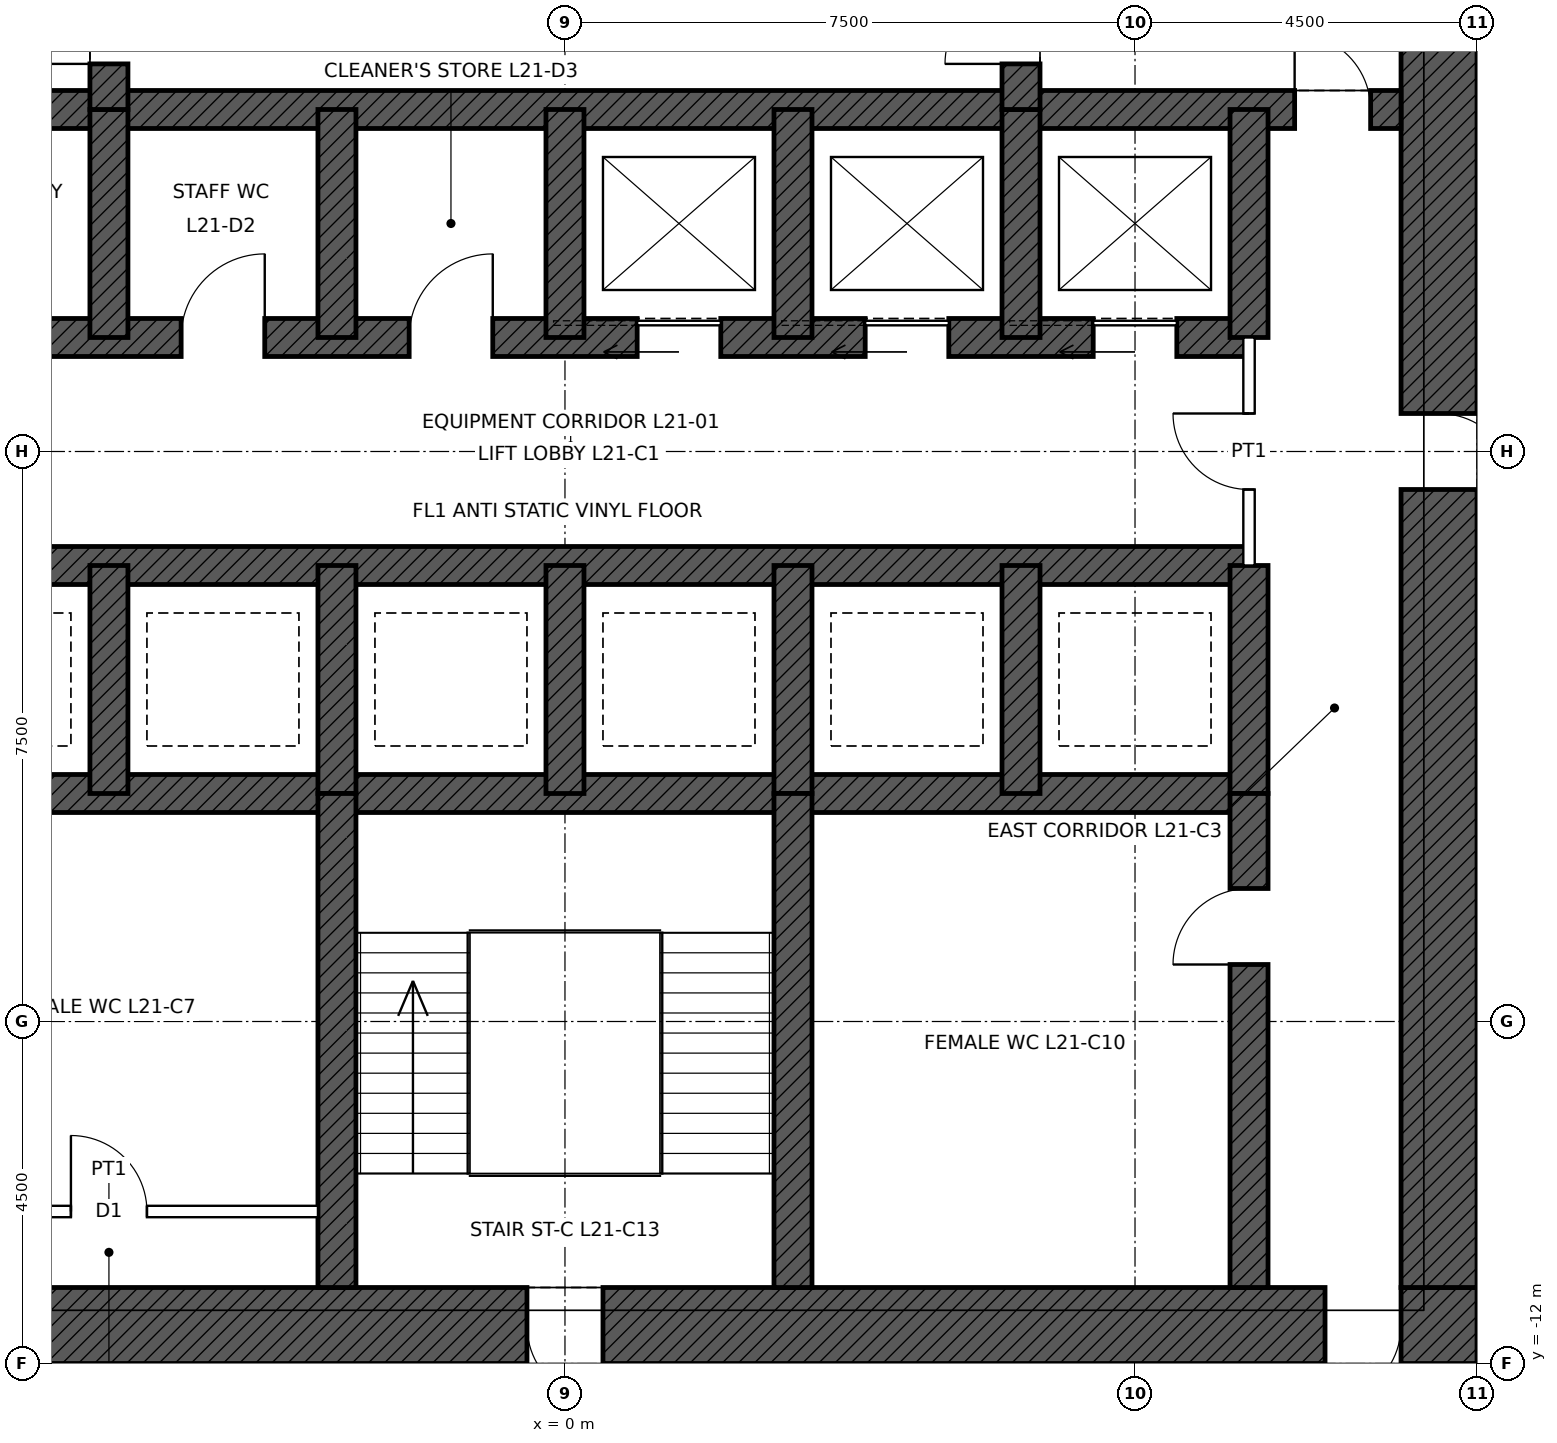
"""IFC4 building model, lengths in metres.
Left out: names, types, materials, properties, quantities, classifications, styles, units other than length and angle.
Written with IfcOpenShell. Run it as: python <this file> out.ifc"""

import sys

from ifc_helpers import new_model, si_unit, direction, frame, frame_2d, origin, place, context, subcontext, project, spatial, rectangle, extrude, element, fill, save


model = new_model("IFC4")
c1 = context("Model", 3, precision=1e-05, world=origin(), true_north=direction((0.0, 1.0)))
c2 = subcontext(c1, "Body", "Model", "MODEL_VIEW")
j1 = project(units=[si_unit("LENGTHUNIT", "METRE"), si_unit("PLANEANGLEUNIT", "RADIAN")], contexts=[c1])
p1 = place(None, origin())
s1 = spatial("IfcSite", under=j1, at=p1, CompositionType="ELEMENT")
p2 = place(p1, origin())
s2 = spatial("IfcBuilding", under=s1, at=p2, CompositionType="ELEMENT")
p3 = place(p2, frame((0.0, 0.0, 108.9)))
s3 = spatial("IfcBuildingStorey", under=s2, at=p3, CompositionType="ELEMENT", Elevation=108.9)
p4 = place(p3, frame((12.0, -11.5, 0.0), z_axis=(0.0, 0.0, 1.0), x_axis=(-1.0, 0.0, 0.0)))
e1 = element("IfcWall", 1, at=p4, inside=s3, PredefinedType="SHEAR", context=c2, shape_type="SweptSolid", body=[
    extrude(rectangle(XDim=24.0, YDim=1.0, at=frame_2d((12.0, 0.0))), origin(), (0.0, 0.0, 1.0), 4.5),
])
p5 = place(p4, frame((11.5, 0.0, 0.0)))
e2 = element("IfcOpeningElement", 2, at=p5, cuts=e1, PredefinedType="OPENING", context=c2, shape_type="SweptSolid", body=[
    extrude(rectangle(XDim=1.0, YDim=2.1, at=frame_2d((0.5, 1.05))), frame((0.0, 0.51, 0.0), z_axis=(0.0, -1.0, 0.0), x_axis=(1.0, 0.0, 0.0)), (0.0, 0.0, 1.0), 1.02),
])
p6 = place(p4, frame((1.0, 0.0, 0.0)))
e3 = element("IfcOpeningElement", 3, at=p6, cuts=e1, PredefinedType="OPENING", context=c2, shape_type="SweptSolid", body=[
    extrude(rectangle(XDim=1.0, YDim=2.4, at=frame_2d((0.5, 1.2))), frame((0.0, 0.51, 0.0), z_axis=(0.0, -1.0, 0.0), x_axis=(1.0, 0.0, 0.0)), (0.0, 0.0, 1.0), 1.02),
])
p7 = place(p3, frame((11.5, 11.0, 0.0), z_axis=(0.0, 0.0, 1.0), x_axis=(0.0, -1.0, 0.0)))
e4 = element("IfcWall", 4, at=p7, inside=s3, PredefinedType="SHEAR", context=c2, shape_type="SweptSolid", body=[
    extrude(rectangle(XDim=22.0, YDim=1.0, at=frame_2d((11.0, 0.0))), origin(), (0.0, 0.0, 1.0), 4.5),
])
p8 = place(p7, frame((10.5, 0.0, 0.0)))
e5 = element("IfcOpeningElement", 5, at=p8, cuts=e4, PredefinedType="OPENING", context=c2, shape_type="SweptSolid", body=[
    extrude(rectangle(XDim=1.0, YDim=2.4, at=frame_2d((0.5, 1.2))), frame((0.0, 0.51, 0.0), z_axis=(0.0, -1.0, 0.0), x_axis=(1.0, 0.0, 0.0)), (0.0, 0.0, 1.0), 1.02),
])
p9 = place(p3, frame((-11.0, 4.5, 0.0), z_axis=(0.0, 0.0, 1.0), x_axis=(1.0, 0.0, 0.0)))
e6 = element("IfcWall", 6, at=p9, inside=s3, PredefinedType="SHEAR", context=c2, shape_type="SweptSolid", body=[
    extrude(rectangle(XDim=22.0, YDim=0.5, at=frame_2d((11.0, 0.0))), origin(), (0.0, 0.0, 1.0), 4.5),
])
p10 = place(p9, frame((0.4, 0.0, 0.0)))
e7 = element("IfcOpeningElement", 7, at=p10, cuts=e6, PredefinedType="OPENING", context=c2, shape_type="SweptSolid", body=[
    extrude(rectangle(XDim=1.0, YDim=2.1, at=frame_2d((0.5, 1.05))), frame((0.0, 0.26, 0.0), z_axis=(0.0, -1.0, 0.0), x_axis=(1.0, 0.0, 0.0)), (0.0, 0.0, 1.0), 0.52),
])
p11 = place(p9, frame((20.6, 0.0, 0.0)))
e8 = element("IfcOpeningElement", 8, at=p11, cuts=e6, PredefinedType="OPENING", context=c2, shape_type="SweptSolid", body=[
    extrude(rectangle(XDim=1.0, YDim=2.1, at=frame_2d((0.5, 1.05))), frame((0.0, 0.26, 0.0), z_axis=(0.0, -1.0, 0.0), x_axis=(1.0, 0.0, 0.0)), (0.0, 0.0, 1.0), 0.52),
])
p12 = place(p3, frame((-9.0, 1.5, 0.0), z_axis=(0.0, 0.0, 1.0), x_axis=(1.0, 0.0, 0.0)))
e9 = element("IfcWall", 9, at=p12, inside=s3, PredefinedType="SHEAR", context=c2, shape_type="SweptSolid", body=[
    extrude(rectangle(XDim=18.0, YDim=0.5, at=frame_2d((9.0, 0.0))), origin(), (0.0, 0.0, 1.0), 4.5),
])
p13 = place(p12, frame((9.95, 0.0, 0.0)))
e10 = element("IfcOpeningElement", 10, at=p13, cuts=e9, PredefinedType="OPENING", context=c2, shape_type="SweptSolid", body=[
    extrude(rectangle(XDim=1.1, YDim=2.1, at=frame_2d((0.55, 1.05))), frame((0.0, 0.26, 0.0), z_axis=(0.0, -1.0, 0.0), x_axis=(1.0, 0.0, 0.0)), (0.0, 0.0, 1.0), 0.52),
])
p14 = place(p12, frame((12.95, 0.0, 0.0)))
e11 = element("IfcOpeningElement", 11, at=p14, cuts=e9, PredefinedType="OPENING", context=c2, shape_type="SweptSolid", body=[
    extrude(rectangle(XDim=1.1, YDim=2.1, at=frame_2d((0.55, 1.05))), frame((0.0, 0.26, 0.0), z_axis=(0.0, -1.0, 0.0), x_axis=(1.0, 0.0, 0.0)), (0.0, 0.0, 1.0), 0.52),
])
p15 = place(p12, frame((15.95, 0.0, 0.0)))
e12 = element("IfcOpeningElement", 12, at=p15, cuts=e9, PredefinedType="OPENING", context=c2, shape_type="SweptSolid", body=[
    extrude(rectangle(XDim=1.1, YDim=2.1, at=frame_2d((0.55, 1.05))), frame((0.0, 0.26, 0.0), z_axis=(0.0, -1.0, 0.0), x_axis=(1.0, 0.0, 0.0)), (0.0, 0.0, 1.0), 0.52),
])
p16 = place(p12, frame((0.95, 0.0, 0.0)))
e13 = element("IfcOpeningElement", 13, at=p16, cuts=e9, PredefinedType="OPENING", context=c2, shape_type="SweptSolid", body=[
    extrude(rectangle(XDim=1.1, YDim=2.1, at=frame_2d((0.55, 1.05))), frame((0.0, 0.26, 0.0), z_axis=(0.0, -1.0, 0.0), x_axis=(1.0, 0.0, 0.0)), (0.0, 0.0, 1.0), 0.52),
])
p17 = place(p12, frame((3.95, 0.0, 0.0)))
e14 = element("IfcOpeningElement", 14, at=p17, cuts=e9, PredefinedType="OPENING", context=c2, shape_type="SweptSolid", body=[
    extrude(rectangle(XDim=1.1, YDim=2.1, at=frame_2d((0.55, 1.05))), frame((0.0, 0.26, 0.0), z_axis=(0.0, -1.0, 0.0), x_axis=(1.0, 0.0, 0.0)), (0.0, 0.0, 1.0), 0.52),
])
p18 = place(p12, frame((6.95, 0.0, 0.0)))
e15 = element("IfcOpeningElement", 15, at=p18, cuts=e9, PredefinedType="OPENING", context=c2, shape_type="SweptSolid", body=[
    extrude(rectangle(XDim=1.1, YDim=2.1, at=frame_2d((0.55, 1.05))), frame((0.0, 0.26, 0.0), z_axis=(0.0, -1.0, 0.0), x_axis=(1.0, 0.0, 0.0)), (0.0, 0.0, 1.0), 0.52),
])
for number, where, z_axis, x_axis in (
    (16, (-9.0, -1.5, 0.0), (0.0, 0.0, 1.0), (1.0, 0.0, 0.0)),
    (17, (-9.0, -4.5, 0.0), (0.0, 0.0, 1.0), (1.0, 0.0, 0.0)),
):
    element("IfcWall", number, at=place(p3, frame(where, z_axis=z_axis, x_axis=x_axis)), inside=s3, PredefinedType="SHEAR", context=c2, shape_type="SweptSolid", body=[
        extrude(rectangle(XDim=18.0, YDim=0.5, at=frame_2d((9.0, 0.0))), origin(), (0.0, 0.0, 1.0), 4.5),
    ])
for number, where, z_axis, x_axis in (
    (18, (9.0, 1.5, 0.0), (0.0, 0.0, 1.0), (0.0, 1.0, 0.0)),
    (19, (9.0, -4.5, 0.0), (0.0, 0.0, 1.0), (0.0, 1.0, 0.0)),
    (20, (-6.0, 1.5, 0.0), (0.0, 0.0, 1.0), (0.0, 1.0, 0.0)),
    (21, (-3.0, 1.5, 0.0), (0.0, 0.0, 1.0), (0.0, 1.0, 0.0)),
    (22, (0.0, 1.5, 0.0), (0.0, 0.0, 1.0), (0.0, 1.0, 0.0)),
    (23, (3.0, 1.5, 0.0), (0.0, 0.0, 1.0), (0.0, 1.0, 0.0)),
    (24, (6.0, 1.5, 0.0), (0.0, 0.0, 1.0), (0.0, 1.0, 0.0)),
    (25, (-6.0, -4.5, 0.0), (0.0, 0.0, 1.0), (0.0, 1.0, 0.0)),
    (26, (-3.0, -4.5, 0.0), (0.0, 0.0, 1.0), (0.0, 1.0, 0.0)),
    (27, (0.0, -4.5, 0.0), (0.0, 0.0, 1.0), (0.0, 1.0, 0.0)),
    (28, (3.0, -4.5, 0.0), (0.0, 0.0, 1.0), (0.0, 1.0, 0.0)),
    (29, (6.0, -4.5, 0.0), (0.0, 0.0, 1.0), (0.0, 1.0, 0.0)),
):
    element("IfcWall", number, at=place(p3, frame(where, z_axis=z_axis, x_axis=x_axis)), inside=s3, PredefinedType="SHEAR", context=c2, shape_type="SweptSolid", body=[
        extrude(rectangle(XDim=3.0, YDim=0.5, at=frame_2d((1.5, 0.0))), origin(), (0.0, 0.0, 1.0), 4.5),
    ])
p19 = place(p3, frame((-6.0, 4.5, 0.0), z_axis=(0.0, 0.0, 1.0), x_axis=(0.0, 1.0, 0.0)))
e30 = element("IfcWall", 30, at=p19, inside=s3, PredefinedType="SHEAR", context=c2, shape_type="SweptSolid", body=[
    extrude(rectangle(XDim=6.5, YDim=0.5, at=frame_2d((3.25, 0.0))), origin(), (0.0, 0.0, 1.0), 4.5),
])
p20 = place(p19, frame((0.6, 0.0, 0.0)))
e31 = element("IfcOpeningElement", 31, at=p20, cuts=e30, PredefinedType="OPENING", context=c2, shape_type="SweptSolid", body=[
    extrude(rectangle(XDim=1.0, YDim=2.1, at=frame_2d((0.5, 1.05))), frame((0.0, 0.26, 0.0), z_axis=(0.0, -1.0, 0.0), x_axis=(1.0, 0.0, 0.0)), (0.0, 0.0, 1.0), 0.52),
])
p21 = place(p3, frame((6.0, 4.5, 0.0), z_axis=(0.0, 0.0, 1.0), x_axis=(0.0, 1.0, 0.0)))
e32 = element("IfcWall", 32, at=p21, inside=s3, PredefinedType="SHEAR", context=c2, shape_type="SweptSolid", body=[
    extrude(rectangle(XDim=6.5, YDim=0.5, at=frame_2d((3.25, 0.0))), origin(), (0.0, 0.0, 1.0), 4.5),
])
p22 = place(p21, frame((0.6, 0.0, 0.0)))
e33 = element("IfcOpeningElement", 33, at=p22, cuts=e32, PredefinedType="OPENING", context=c2, shape_type="SweptSolid", body=[
    extrude(rectangle(XDim=1.0, YDim=2.1, at=frame_2d((0.5, 1.05))), frame((0.0, 0.26, 0.0), z_axis=(0.0, -1.0, 0.0), x_axis=(1.0, 0.0, 0.0)), (0.0, 0.0, 1.0), 0.52),
])
p23 = place(p3, frame((9.0, -11.0, 0.0), z_axis=(0.0, 0.0, 1.0), x_axis=(0.0, 1.0, 0.0)))
e34 = element("IfcWall", 34, at=p23, inside=s3, PredefinedType="SHEAR", context=c2, shape_type="SweptSolid", body=[
    extrude(rectangle(XDim=6.5, YDim=0.5, at=frame_2d((3.25, 0.0))), origin(), (0.0, 0.0, 1.0), 4.5),
])
p24 = place(p23, frame((4.25, 0.0, 0.0)))
e35 = element("IfcOpeningElement", 35, at=p24, cuts=e34, PredefinedType="OPENING", context=c2, shape_type="SweptSolid", body=[
    extrude(rectangle(XDim=1.0, YDim=2.1, at=frame_2d((0.5, 1.05))), frame((0.0, 0.26, 0.0), z_axis=(0.0, -1.0, 0.0), x_axis=(1.0, 0.0, 0.0)), (0.0, 0.0, 1.0), 0.52),
])
for number, where, z_axis, x_axis in (
    (36, (-3.0, -11.0, 0.0), (0.0, 0.0, 1.0), (0.0, 1.0, 0.0)),
    (37, (3.0, -11.0, 0.0), (0.0, 0.0, 1.0), (0.0, 1.0, 0.0)),
):
    element("IfcWall", number, at=place(p3, frame(where, z_axis=z_axis, x_axis=x_axis)), inside=s3, PredefinedType="SHEAR", context=c2, shape_type="SweptSolid", body=[
        extrude(rectangle(XDim=6.5, YDim=0.5, at=frame_2d((3.25, 0.0))), origin(), (0.0, 0.0, 1.0), 4.5),
    ])
p25 = place(p3, frame((-8.75, -10.0, 0.0), z_axis=(0.0, 0.0, 1.0), x_axis=(1.0, 0.0, 0.0)))
e38 = element("IfcWall", 38, at=p25, inside=s3, PredefinedType="PARTITIONING", context=c2, shape_type="SweptSolid", body=[
    extrude(rectangle(XDim=5.5, YDim=0.15, at=frame_2d((2.75, 0.0))), origin(), (0.0, 0.0, 1.0), 4.25),
])
p26 = place(p25, frame((2.25, 0.0, 0.0)))
e39 = element("IfcOpeningElement", 39, at=p26, cuts=e38, PredefinedType="OPENING", context=c2, shape_type="SweptSolid", body=[
    extrude(rectangle(XDim=1.0, YDim=2.1, at=frame_2d((0.5, 1.05))), frame((0.0, 0.085, 0.0), z_axis=(0.0, -1.0, 0.0), x_axis=(1.0, 0.0, 0.0)), (0.0, 0.0, 1.0), 0.17),
])
p27 = place(p3, frame((9.0, -1.5, 0.0), z_axis=(0.0, 0.0, 1.0), x_axis=(0.0, 1.0, 0.0)))
e40 = element("IfcWall", 40, at=p27, inside=s3, PredefinedType="PARTITIONING", context=c2, shape_type="SweptSolid", body=[
    extrude(rectangle(XDim=3.0, YDim=0.15, at=frame_2d((1.5, 0.0))), origin(), (0.0, 0.0, 1.0), 4.25),
])
p28 = place(p27, frame((1.0, 0.0, 0.0)))
e41 = element("IfcOpeningElement", 41, at=p28, cuts=e40, PredefinedType="OPENING", context=c2, shape_type="SweptSolid", body=[
    extrude(rectangle(XDim=1.0, YDim=2.4, at=frame_2d((0.5, 1.2))), frame((0.0, 0.085, 0.0), z_axis=(0.0, -1.0, 0.0), x_axis=(1.0, 0.0, 0.0)), (0.0, 0.0, 1.0), 0.17),
])
p29 = place(p11, origin())
e42 = element("IfcDoor", 42, at=p29, inside=s3, OperationType="SINGLE_SWING_LEFT", PredefinedType="DOOR", context=c2, shape_type="SweptSolid", body=[
    extrude(rectangle(XDim=1.0, YDim=2.1, at=frame_2d((0.5, 1.05))), frame((0.0, 0.025, 0.0), z_axis=(0.0, -1.0, 0.0), x_axis=(1.0, 0.0, 0.0)), (0.0, 0.0, 1.0), 0.05),
])
fill(e8, e42)
p30 = place(p20, origin())
e43 = element("IfcDoor", 43, at=p30, inside=s3, OperationType="SINGLE_SWING_LEFT", PredefinedType="DOOR", context=c2, shape_type="SweptSolid", body=[
    extrude(rectangle(XDim=1.0, YDim=2.1, at=frame_2d((0.5, 1.05))), frame((0.0, 0.025, 0.0), z_axis=(0.0, -1.0, 0.0), x_axis=(1.0, 0.0, 0.0)), (0.0, 0.0, 1.0), 0.05),
])
fill(e31, e43)
p31 = place(p22, origin())
e44 = element("IfcDoor", 44, at=p31, inside=s3, OperationType="SINGLE_SWING_LEFT", PredefinedType="DOOR", context=c2, shape_type="SweptSolid", body=[
    extrude(rectangle(XDim=1.0, YDim=2.1, at=frame_2d((0.5, 1.05))), frame((0.0, 0.025, 0.0), z_axis=(0.0, -1.0, 0.0), x_axis=(1.0, 0.0, 0.0)), (0.0, 0.0, 1.0), 0.05),
])
fill(e33, e44)
p32 = place(p5, origin())
e45 = element("IfcDoor", 45, at=p32, inside=s3, OperationType="SINGLE_SWING_LEFT", PredefinedType="DOOR", context=c2, shape_type="SweptSolid", body=[
    extrude(rectangle(XDim=1.0, YDim=2.1, at=frame_2d((0.5, 1.05))), frame((0.0, 0.485, 0.0), z_axis=(0.0, -1.0, 0.0), x_axis=(1.0, 0.0, 0.0)), (0.0, 0.0, 1.0), 0.05),
])
fill(e2, e45)
p33 = place(p8, origin())
e46 = element("IfcDoor", 46, at=p33, inside=s3, OperationType="SINGLE_SWING_RIGHT", PredefinedType="DOOR", context=c2, shape_type="SweptSolid", body=[
    extrude(rectangle(XDim=1.0, YDim=2.4, at=frame_2d((0.5, 1.2))), frame((0.0, 0.485, 0.0), z_axis=(0.0, -1.0, 0.0), x_axis=(1.0, 0.0, 0.0)), (0.0, 0.0, 1.0), 0.05),
])
fill(e5, e46)
p34 = place(p6, origin())
e47 = element("IfcDoor", 47, at=p34, inside=s3, OperationType="SINGLE_SWING_RIGHT", PredefinedType="DOOR", context=c2, shape_type="SweptSolid", body=[
    extrude(rectangle(XDim=1.0, YDim=2.4, at=frame_2d((0.5, 1.2))), frame((0.0, 0.485, 0.0), z_axis=(0.0, -1.0, 0.0), x_axis=(1.0, 0.0, 0.0)), (0.0, 0.0, 1.0), 0.05),
])
fill(e3, e47)
p35 = place(p24, origin())
e48 = element("IfcDoor", 48, at=p35, inside=s3, OperationType="SINGLE_SWING_LEFT", PredefinedType="DOOR", context=c2, shape_type="SweptSolid", body=[
    extrude(rectangle(XDim=1.0, YDim=2.1, at=frame_2d((0.5, 1.05))), frame((0.0, 0.025, 0.0), z_axis=(0.0, -1.0, 0.0), x_axis=(1.0, 0.0, 0.0)), (0.0, 0.0, 1.0), 0.05),
])
fill(e35, e48)
p36 = place(p13, origin())
e49 = element("IfcDoor", 49, at=p36, inside=s3, OperationType="SLIDING_TO_LEFT", PredefinedType="DOOR", context=c2, shape_type="SweptSolid", body=[
    extrude(rectangle(XDim=1.1, YDim=2.1, at=frame_2d((0.55, 1.05))), frame((0.0, 0.025, 0.0), z_axis=(0.0, -1.0, 0.0), x_axis=(1.0, 0.0, 0.0)), (0.0, 0.0, 1.0), 0.05),
])
fill(e10, e49)
p37 = place(p14, origin())
e50 = element("IfcDoor", 50, at=p37, inside=s3, OperationType="SLIDING_TO_LEFT", PredefinedType="DOOR", context=c2, shape_type="SweptSolid", body=[
    extrude(rectangle(XDim=1.1, YDim=2.1, at=frame_2d((0.55, 1.05))), frame((0.0, 0.025, 0.0), z_axis=(0.0, -1.0, 0.0), x_axis=(1.0, 0.0, 0.0)), (0.0, 0.0, 1.0), 0.05),
])
fill(e11, e50)
p38 = place(p15, origin())
e51 = element("IfcDoor", 51, at=p38, inside=s3, OperationType="SLIDING_TO_LEFT", PredefinedType="DOOR", context=c2, shape_type="SweptSolid", body=[
    extrude(rectangle(XDim=1.1, YDim=2.1, at=frame_2d((0.55, 1.05))), frame((0.0, 0.025, 0.0), z_axis=(0.0, -1.0, 0.0), x_axis=(1.0, 0.0, 0.0)), (0.0, 0.0, 1.0), 0.05),
])
fill(e12, e51)
p39 = place(p26, origin())
e52 = element("IfcDoor", 52, at=p39, inside=s3, OperationType="SINGLE_SWING_LEFT", PredefinedType="DOOR", context=c2, shape_type="SweptSolid", body=[
    extrude(rectangle(XDim=1.0, YDim=2.1, at=frame_2d((0.5, 1.05))), frame((0.0, 0.025, 0.0), z_axis=(0.0, -1.0, 0.0), x_axis=(1.0, 0.0, 0.0)), (0.0, 0.0, 1.0), 0.05),
])
fill(e39, e52)
p40 = place(p28, origin())
e53 = element("IfcDoor", 53, at=p40, inside=s3, OperationType="SINGLE_SWING_RIGHT", PredefinedType="DOOR", context=c2, shape_type="SweptSolid", body=[
    extrude(rectangle(XDim=1.0, YDim=2.4, at=frame_2d((0.5, 1.2))), frame((0.0, 0.025, 0.0), z_axis=(0.0, -1.0, 0.0), x_axis=(1.0, 0.0, 0.0)), (0.0, 0.0, 1.0), 0.05),
])
fill(e41, e53)
p41 = place(p17, origin())
e54 = element("IfcDoor", 54, at=p41, inside=s3, OperationType="SINGLE_SWING_RIGHT", PredefinedType="DOOR", context=c2, shape_type="SweptSolid", body=[
    extrude(rectangle(XDim=1.1, YDim=2.1, at=frame_2d((0.55, 1.05))), frame((0.0, 0.025, 0.0), z_axis=(0.0, -1.0, 0.0), x_axis=(1.0, 0.0, 0.0)), (0.0, 0.0, 1.0), 0.05),
])
fill(e14, e54)
p42 = place(p18, origin())
e55 = element("IfcDoor", 55, at=p42, inside=s3, OperationType="SINGLE_SWING_RIGHT", PredefinedType="DOOR", context=c2, shape_type="SweptSolid", body=[
    extrude(rectangle(XDim=1.1, YDim=2.1, at=frame_2d((0.55, 1.05))), frame((0.0, 0.025, 0.0), z_axis=(0.0, -1.0, 0.0), x_axis=(1.0, 0.0, 0.0)), (0.0, 0.0, 1.0), 0.05),
])
fill(e15, e55)
save(model, sys.argv[1])
